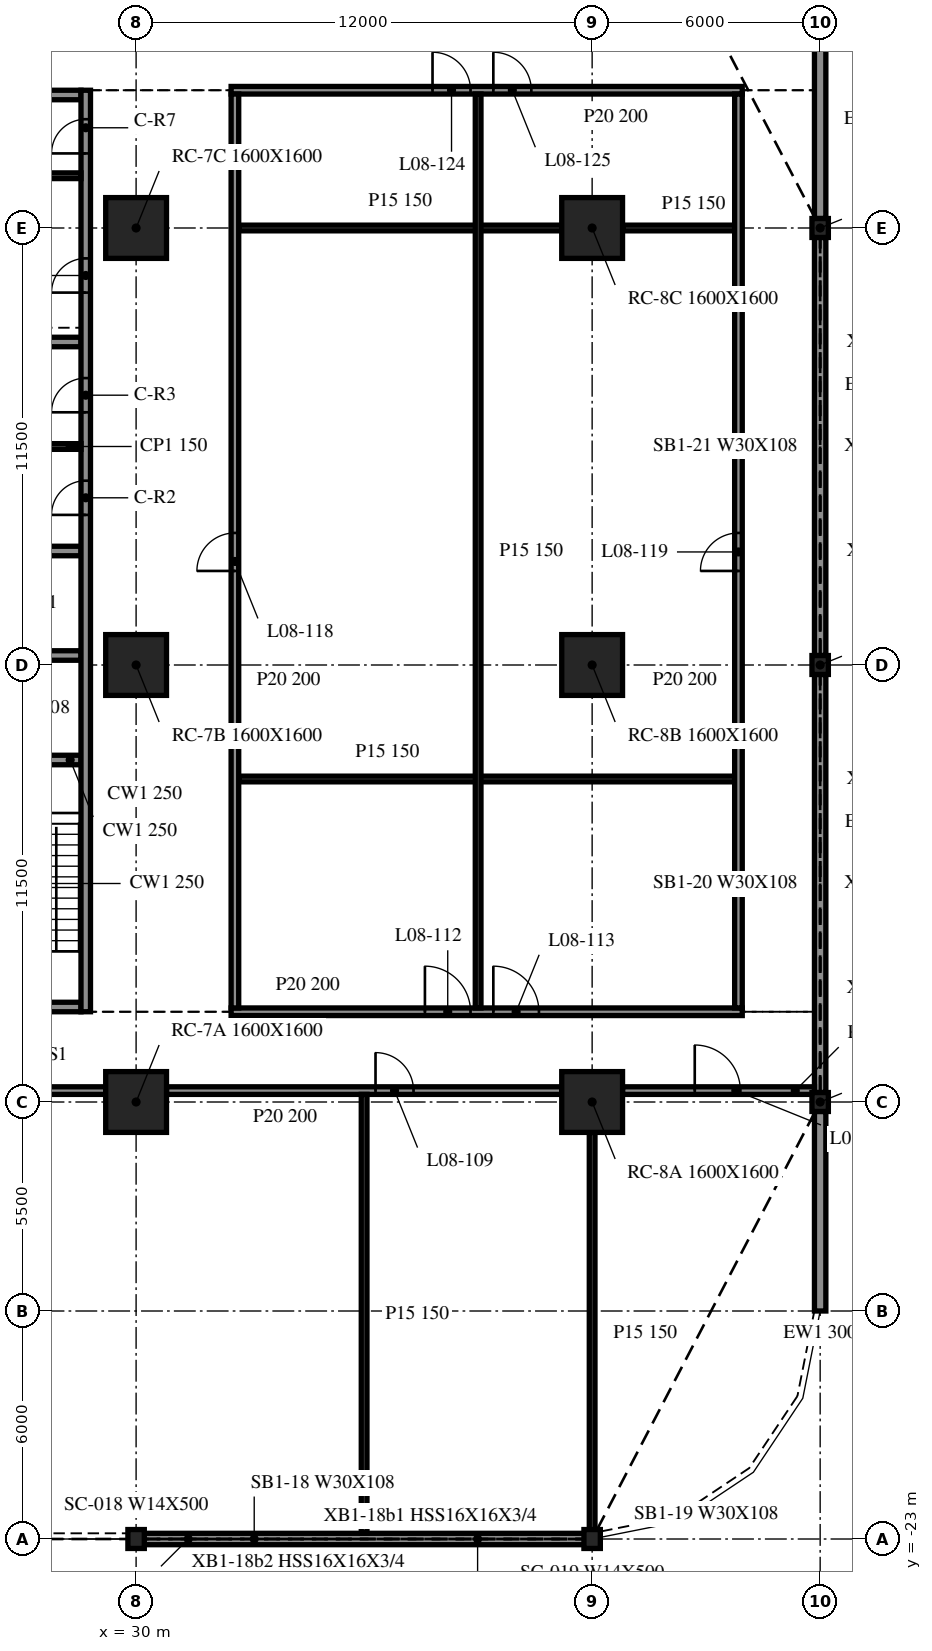
"""IFC4 building model, lengths in metres.
Left out: names, types, materials, properties, quantities, classifications, styles, units other than length and angle.
Written with IfcOpenShell. Run it as: python <this file> out.ifc"""

import sys

from ifc_helpers import new_model, si_unit, direction, frame, frame_2d, origin, origin_2d, place, context, subcontext, project, spatial, rectangle, i_section, extrude, element, fill, save


model = new_model("IFC4")
c1 = context("Model", 3, precision=1e-05, world=origin(), true_north=direction((0.0, 1.0)))
c2 = subcontext(c1, "Body", "Model", "MODEL_VIEW")
j1 = project(units=[si_unit("LENGTHUNIT", "METRE"), si_unit("PLANEANGLEUNIT", "RADIAN")], contexts=[c1])
p1 = place(None, origin())
s1 = spatial("IfcSite", under=j1, at=p1, CompositionType="ELEMENT")
p2 = place(p1, origin())
s2 = spatial("IfcBuilding", under=s1, at=p2, CompositionType="ELEMENT")
p3 = place(p2, frame((0.0, 0.0, 37.3)))
s3 = spatial("IfcBuildingStorey", under=s2, at=p3, CompositionType="ELEMENT", Elevation=37.3)
for number, where, z_axis, x_axis in (
    (1, (30.0, -11.5, -0.34), (0.0, 0.0, 1.0), (1.0, 0.0, 0.0)),
    (2, (30.0, 0.0, -0.34), (0.0, 0.0, 1.0), (1.0, 0.0, 0.0)),
    (3, (30.0, 11.5, -0.34), (0.0, 0.0, 1.0), (1.0, 0.0, 0.0)),
    (4, (42.0, -11.5, -0.34), (0.0, 0.0, 1.0), (1.0, 0.0, 0.0)),
    (5, (42.0, 0.0, -0.34), (0.0, 0.0, 1.0), (1.0, 0.0, 0.0)),
    (6, (42.0, 11.5, -0.34), (0.0, 0.0, 1.0), (1.0, 0.0, 0.0)),
):
    element("IfcColumn", number, at=place(p3, frame(where, z_axis=z_axis, x_axis=x_axis)), inside=s3, PredefinedType="COLUMN", context=c2, shape_type="SweptSolid", body=[
        extrude(rectangle(XDim=1.6, YDim=1.6, at=origin_2d()), origin(), (0.0, 0.0, 1.0), 4.09),
    ])
for number, where, z_axis, x_axis in (
    (7, (30.0, -23.0, -0.34), (0.0, 0.0, 1.0), (1.0, 0.0, 0.0)),
    (8, (42.0, -23.0, -0.34), (0.0, 0.0, 1.0), (1.0, 0.0, 0.0)),
    (9, (48.0, -11.5, -0.34), (0.0, 0.0, 1.0), (1.0, 0.0, 0.0)),
    (10, (48.0, 0.0, -0.34), (0.0, 0.0, 1.0), (1.0, 0.0, 0.0)),
    (11, (48.0, 11.5, -0.34), (0.0, 0.0, 1.0), (1.0, 0.0, 0.0)),
):
    element("IfcColumn", number, at=place(p3, frame(where, z_axis=z_axis, x_axis=x_axis)), inside=s3, PredefinedType="COLUMN", context=c2, shape_type="SweptSolid", body=[
        extrude(i_section(OverallWidth=0.432, OverallDepth=0.498, WebThickness=0.056, FlangeThickness=0.089, at=origin_2d()), origin(), (0.0, 0.0, 1.0), 4.09),
    ])
p4 = place(p3, frame((30.028, -23.0, 0.0), z_axis=(0.0, 0.0, 1.0), x_axis=(1.0, 0.0, 0.0)))
e12 = element("IfcWall", 12, at=p4, inside=s3, PredefinedType="NOTDEFINED", context=c2, shape_type="SweptSolid", body=[
    extrude(rectangle(XDim=11.944, YDim=0.3, at=frame_2d((5.972, 0.0))), origin(), (0.0, 0.0, 1.0), 3.75),
])
p5 = place(p3, frame((48.0, -17.0, 0.0), z_axis=(0.0, 0.0, 1.0), x_axis=(0.0, 1.0, 0.0)))
e13 = element("IfcWall", 13, at=p5, inside=s3, PredefinedType="NOTDEFINED", context=c2, shape_type="SweptSolid", body=[
    extrude(rectangle(XDim=5.251, YDim=0.3, at=frame_2d((2.625, 0.0))), origin(), (0.0, 0.0, 1.0), 3.75),
])
for number, where, z_axis, x_axis in (
    (14, (48.0, -11.251, 0.0), (0.0, 0.0, 1.0), (0.0, 1.0, 0.0)),
    (15, (48.0, 0.249, 0.0), (0.0, 0.0, 1.0), (0.0, 1.0, 0.0)),
):
    element("IfcWall", number, at=place(p3, frame(where, z_axis=z_axis, x_axis=x_axis)), inside=s3, PredefinedType="NOTDEFINED", context=c2, shape_type="SweptSolid", body=[
        extrude(rectangle(XDim=11.002, YDim=0.3, at=frame_2d((5.501, 0.0))), origin(), (0.0, 0.0, 1.0), 3.75),
    ])
p6 = place(p3, frame((48.0, 11.749, 0.0), z_axis=(0.0, 0.0, 1.0), x_axis=(0.0, 1.0, 0.0)))
e16 = element("IfcWall", 16, at=p6, inside=s3, PredefinedType="NOTDEFINED", context=c2, shape_type="SweptSolid", body=[
    extrude(rectangle(XDim=5.251, YDim=0.3, at=frame_2d((2.625, 0.0))), origin(), (0.0, 0.0, 1.0), 3.75),
])
p7 = place(p3, frame((28.675, -9.125, 0.0), z_axis=(0.0, 0.0, 1.0), x_axis=(0.0, 1.0, 0.0)))
e17 = element("IfcWall", 17, at=p7, inside=s3, PredefinedType="SOLIDWALL", context=c2, shape_type="SweptSolid", body=[
    extrude(rectangle(XDim=24.25, YDim=0.25, at=frame_2d((12.125, 0.0))), origin(), (0.0, 0.0, 1.0), 3.75),
])
p8 = place(p7, frame((13.075, 0.0, 0.0)))
e18 = element("IfcOpeningElement", 18, at=p8, cuts=e17, PredefinedType="OPENING", context=c2, shape_type="SweptSolid", body=[
    extrude(rectangle(XDim=0.9, YDim=2.1, at=frame_2d((0.45, 1.05))), frame((0.0, 0.135, 0.0), z_axis=(0.0, -1.0, 0.0), x_axis=(1.0, 0.0, 0.0)), (0.0, 0.0, 1.0), 0.27),
])
p9 = place(p7, frame((15.775, 0.0, 0.0)))
e19 = element("IfcOpeningElement", 19, at=p9, cuts=e17, PredefinedType="OPENING", context=c2, shape_type="SweptSolid", body=[
    extrude(rectangle(XDim=0.9, YDim=2.1, at=frame_2d((0.45, 1.05))), frame((0.0, 0.135, 0.0), z_axis=(0.0, -1.0, 0.0), x_axis=(1.0, 0.0, 0.0)), (0.0, 0.0, 1.0), 0.27),
])
p10 = place(p7, frame((18.925, 0.0, 0.0)))
e20 = element("IfcOpeningElement", 20, at=p10, cuts=e17, PredefinedType="OPENING", context=c2, shape_type="SweptSolid", body=[
    extrude(rectangle(XDim=0.9, YDim=2.1, at=frame_2d((0.45, 1.05))), frame((0.0, 0.135, 0.0), z_axis=(0.0, -1.0, 0.0), x_axis=(1.0, 0.0, 0.0)), (0.0, 0.0, 1.0), 0.27),
])
p11 = place(p7, frame((22.587, 0.0, 0.0)))
e21 = element("IfcOpeningElement", 21, at=p11, cuts=e17, PredefinedType="OPENING", context=c2, shape_type="SweptSolid", body=[
    extrude(rectangle(XDim=0.9, YDim=2.1, at=frame_2d((0.45, 1.05))), frame((0.0, 0.135, 0.0), z_axis=(0.0, -1.0, 0.0), x_axis=(1.0, 0.0, 0.0)), (0.0, 0.0, 1.0), 0.27),
])
p12 = place(p3, frame((28.55, -9.0, 0.0), z_axis=(0.0, 0.0, 1.0), x_axis=(-1.0, 0.0, 0.0)))
e22 = element("IfcWall", 22, at=p12, inside=s3, PredefinedType="SOLIDWALL", context=c2, shape_type="SweptSolid", body=[
    extrude(rectangle(XDim=9.1, YDim=0.25, at=frame_2d((4.55, 0.0))), origin(), (0.0, 0.0, 1.0), 3.75),
])
p13 = place(p12, frame((3.65, 0.0, 0.0)))
e23 = element("IfcOpeningElement", 23, at=p13, cuts=e22, PredefinedType="OPENING", context=c2, shape_type="SweptSolid", body=[
    extrude(rectangle(XDim=1.8, YDim=2.1, at=frame_2d((0.9, 1.05))), frame((0.0, 0.135, 0.0), z_axis=(0.0, -1.0, 0.0), x_axis=(1.0, 0.0, 0.0)), (0.0, 0.0, 1.0), 0.27),
])
p14 = place(p3, frame((19.45, 15.0, 0.0), z_axis=(0.0, 0.0, 1.0), x_axis=(1.0, 0.0, 0.0)))
e24 = element("IfcWall", 24, at=p14, inside=s3, PredefinedType="SOLIDWALL", context=c2, shape_type="SweptSolid", body=[
    extrude(rectangle(XDim=9.1, YDim=0.25, at=frame_2d((4.55, 0.0))), origin(), (0.0, 0.0, 1.0), 3.75),
])
p15 = place(p14, frame((3.65, 0.0, 0.0)))
e25 = element("IfcOpeningElement", 25, at=p15, cuts=e24, PredefinedType="OPENING", context=c2, shape_type="SweptSolid", body=[
    extrude(rectangle(XDim=1.8, YDim=2.1, at=frame_2d((0.9, 1.05))), frame((0.0, 0.135, 0.0), z_axis=(0.0, -1.0, 0.0), x_axis=(1.0, 0.0, 0.0)), (0.0, 0.0, 1.0), 0.27),
])
for number, where, z_axis, x_axis in (
    (26, (25.7, -2.5, 0.0), (0.0, 0.0, 1.0), (1.0, 0.0, 0.0)),
    (27, (25.7, 0.25, 0.0), (0.0, 0.0, 1.0), (1.0, 0.0, 0.0)),
    (28, (25.7, 3.0, 0.0), (0.0, 0.0, 1.0), (1.0, 0.0, 0.0)),
    (29, (25.7, 8.5, 0.0), (0.0, 0.0, 1.0), (1.0, 0.0, 0.0)),
):
    element("IfcWall", number, at=place(p3, frame(where, z_axis=z_axis, x_axis=x_axis)), inside=s3, PredefinedType="SOLIDWALL", context=c2, shape_type="SweptSolid", body=[
        extrude(rectangle(XDim=2.85, YDim=0.25, at=frame_2d((1.425, 0.0))), origin(), (0.0, 0.0, 1.0), 3.75),
    ])
for number, where, z_axis, x_axis in (
    (30, (25.7, 5.75, 0.0), (0.0, 0.0, 1.0), (1.0, 0.0, 0.0)),
    (31, (25.7, 12.875, 0.0), (0.0, 0.0, 1.0), (1.0, 0.0, 0.0)),
):
    element("IfcWall", number, at=place(p3, frame(where, z_axis=z_axis, x_axis=x_axis)), inside=s3, PredefinedType="PARTITIONING", context=c2, shape_type="SweptSolid", body=[
        extrude(rectangle(XDim=2.85, YDim=0.15, at=frame_2d((1.425, 0.0))), origin(), (0.0, 0.0, 1.0), 3.75),
    ])
p16 = place(p3, frame((18.8, -11.2, 0.0), z_axis=(0.0, 0.0, 1.0), x_axis=(1.0, 0.0, 0.0)))
e32 = element("IfcWall", 32, at=p16, inside=s3, PredefinedType="PARTITIONING", context=c2, shape_type="SweptSolid", body=[
    extrude(rectangle(XDim=10.4, YDim=0.2, at=frame_2d((5.2, 0.0))), origin(), (0.0, 0.0, 1.0), 3.75),
])
p17 = place(p16, frame((5.5, 0.0, 0.0)))
e33 = element("IfcOpeningElement", 33, at=p17, cuts=e32, PredefinedType="OPENING", context=c2, shape_type="SweptSolid", body=[
    extrude(rectangle(XDim=1.2, YDim=2.1, at=frame_2d((0.6, 1.05))), frame((0.0, 0.11, 0.0), z_axis=(0.0, -1.0, 0.0), x_axis=(1.0, 0.0, 0.0)), (0.0, 0.0, 1.0), 0.22),
])
p18 = place(p3, frame((30.8, -11.2, 0.0), z_axis=(0.0, 0.0, 1.0), x_axis=(1.0, 0.0, 0.0)))
e34 = element("IfcWall", 34, at=p18, inside=s3, PredefinedType="PARTITIONING", context=c2, shape_type="SweptSolid", body=[
    extrude(rectangle(XDim=10.4, YDim=0.2, at=frame_2d((5.2, 0.0))), origin(), (0.0, 0.0, 1.0), 2.751),
])
p19 = place(p18, frame((5.5, 0.0, 0.0)))
e35 = element("IfcOpeningElement", 35, at=p19, cuts=e34, PredefinedType="OPENING", context=c2, shape_type="SweptSolid", body=[
    extrude(rectangle(XDim=1.0, YDim=2.1, at=frame_2d((0.5, 1.05))), frame((0.0, 0.11, 0.0), z_axis=(0.0, -1.0, 0.0), x_axis=(1.0, 0.0, 0.0)), (0.0, 0.0, 1.0), 0.22),
])
p20 = place(p3, frame((42.8, -11.2, 0.0), z_axis=(0.0, 0.0, 1.0), x_axis=(1.0, 0.0, 0.0)))
e36 = element("IfcWall", 36, at=p20, inside=s3, PredefinedType="PARTITIONING", context=c2, shape_type="SweptSolid", body=[
    extrude(rectangle(XDim=5.05, YDim=0.2, at=frame_2d((2.525, 0.0))), origin(), (0.0, 0.0, 1.0), 2.751),
])
p21 = place(p20, frame((1.9, 0.0, 0.0)))
e37 = element("IfcOpeningElement", 37, at=p21, cuts=e36, PredefinedType="OPENING", context=c2, shape_type="SweptSolid", body=[
    extrude(rectangle(XDim=1.2, YDim=2.1, at=frame_2d((0.6, 1.05))), frame((0.0, 0.11, 0.0), z_axis=(0.0, -1.0, 0.0), x_axis=(1.0, 0.0, 0.0)), (0.0, 0.0, 1.0), 0.22),
])
p22 = place(p3, frame((32.5, -9.125, 0.0), z_axis=(0.0, 0.0, 1.0), x_axis=(1.0, 0.0, 0.0)))
e38 = element("IfcWall", 38, at=p22, inside=s3, PredefinedType="PARTITIONING", context=c2, shape_type="SweptSolid", body=[
    extrude(rectangle(XDim=13.45, YDim=0.2, at=frame_2d((6.725, 0.0))), origin(), (0.0, 0.0, 1.0), 3.75),
])
p23 = place(p22, frame((5.1, 0.0, 0.0)))
e39 = element("IfcOpeningElement", 39, at=p23, cuts=e38, PredefinedType="OPENING", context=c2, shape_type="SweptSolid", body=[
    extrude(rectangle(XDim=1.2, YDim=2.1, at=frame_2d((0.6, 1.05))), frame((0.0, 0.11, 0.0), z_axis=(0.0, -1.0, 0.0), x_axis=(1.0, 0.0, 0.0)), (0.0, 0.0, 1.0), 0.22),
])
p24 = place(p22, frame((6.9, 0.0, 0.0)))
e40 = element("IfcOpeningElement", 40, at=p24, cuts=e38, PredefinedType="OPENING", context=c2, shape_type="SweptSolid", body=[
    extrude(rectangle(XDim=1.2, YDim=2.1, at=frame_2d((0.6, 1.05))), frame((0.0, 0.11, 0.0), z_axis=(0.0, -1.0, 0.0), x_axis=(1.0, 0.0, 0.0)), (0.0, 0.0, 1.0), 0.22),
])
p25 = place(p3, frame((32.7, -3.0, 0.0), z_axis=(0.0, 0.0, 1.0), x_axis=(1.0, 0.0, 0.0)))
e41 = element("IfcWall", 41, at=p25, inside=s3, PredefinedType="PARTITIONING", context=c2, shape_type="SweptSolid", body=[
    extrude(rectangle(XDim=13.05, YDim=0.15, at=frame_2d((6.525, 0.0))), origin(), (0.0, 0.0, 1.0), 3.75),
])
p26 = place(p3, frame((32.7, 11.5, 0.0), z_axis=(0.0, 0.0, 1.0), x_axis=(1.0, 0.0, 0.0)))
e42 = element("IfcWall", 42, at=p26, inside=s3, PredefinedType="PARTITIONING", context=c2, shape_type="SweptSolid", body=[
    extrude(rectangle(XDim=8.5, YDim=0.15, at=frame_2d((4.25, 0.0))), origin(), (0.0, 0.0, 1.0), 2.751),
])
p27 = place(p3, frame((42.8, 11.5, 0.0), z_axis=(0.0, 0.0, 1.0), x_axis=(1.0, 0.0, 0.0)))
e43 = element("IfcWall", 43, at=p27, inside=s3, PredefinedType="PARTITIONING", context=c2, shape_type="SweptSolid", body=[
    extrude(rectangle(XDim=2.95, YDim=0.15, at=frame_2d((1.475, 0.0))), origin(), (0.0, 0.0, 1.0), 2.751),
])
p28 = place(p3, frame((32.5, 15.125, 0.0), z_axis=(0.0, 0.0, 1.0), x_axis=(1.0, 0.0, 0.0)))
e44 = element("IfcWall", 44, at=p28, inside=s3, PredefinedType="PARTITIONING", context=c2, shape_type="SweptSolid", body=[
    extrude(rectangle(XDim=13.45, YDim=0.2, at=frame_2d((6.725, 0.0))), origin(), (0.0, 0.0, 1.0), 3.75),
])
p29 = place(p28, frame((5.3, 0.0, 0.0)))
e45 = element("IfcOpeningElement", 45, at=p29, cuts=e44, PredefinedType="OPENING", context=c2, shape_type="SweptSolid", body=[
    extrude(rectangle(XDim=1.0, YDim=2.1, at=frame_2d((0.5, 1.05))), frame((0.0, 0.11, 0.0), z_axis=(0.0, -1.0, 0.0), x_axis=(1.0, 0.0, 0.0)), (0.0, 0.0, 1.0), 0.22),
])
p30 = place(p28, frame((6.9, 0.0, 0.0)))
e46 = element("IfcOpeningElement", 46, at=p30, cuts=e44, PredefinedType="OPENING", context=c2, shape_type="SweptSolid", body=[
    extrude(rectangle(XDim=1.0, YDim=2.1, at=frame_2d((0.5, 1.05))), frame((0.0, 0.11, 0.0), z_axis=(0.0, -1.0, 0.0), x_axis=(1.0, 0.0, 0.0)), (0.0, 0.0, 1.0), 0.22),
])
p31 = place(p3, frame((32.6, -9.025, 0.0), z_axis=(0.0, 0.0, 1.0), x_axis=(0.0, 1.0, 0.0)))
e47 = element("IfcWall", 47, at=p31, inside=s3, PredefinedType="PARTITIONING", context=c2, shape_type="SweptSolid", body=[
    extrude(rectangle(XDim=24.05, YDim=0.2, at=frame_2d((12.025, 0.0))), origin(), (0.0, 0.0, 1.0), 3.75),
])
p32 = place(p31, frame((11.5, 0.0, 0.0)))
e48 = element("IfcOpeningElement", 48, at=p32, cuts=e47, PredefinedType="OPENING", context=c2, shape_type="SweptSolid", body=[
    extrude(rectangle(XDim=1.0, YDim=2.1, at=frame_2d((0.5, 1.05))), frame((0.0, 0.11, 0.0), z_axis=(0.0, -1.0, 0.0), x_axis=(1.0, 0.0, 0.0)), (0.0, 0.0, 1.0), 0.22),
])
p33 = place(p3, frame((36.0, -22.85, 0.0), z_axis=(0.0, 0.0, 1.0), x_axis=(0.0, 1.0, 0.0)))
e49 = element("IfcWall", 49, at=p33, inside=s3, PredefinedType="PARTITIONING", context=c2, shape_type="SweptSolid", body=[
    extrude(rectangle(XDim=11.55, YDim=0.15, at=frame_2d((5.775, 0.0))), origin(), (0.0, 0.0, 1.0), 3.75),
])
p34 = place(p3, frame((39.0, -9.025, 0.0), z_axis=(0.0, 0.0, 1.0), x_axis=(0.0, 1.0, 0.0)))
e50 = element("IfcWall", 50, at=p34, inside=s3, PredefinedType="PARTITIONING", context=c2, shape_type="SweptSolid", body=[
    extrude(rectangle(XDim=24.05, YDim=0.15, at=frame_2d((12.025, 0.0))), origin(), (0.0, 0.0, 1.0), 3.75),
])
p35 = place(p3, frame((42.0, -22.847, 0.0), z_axis=(0.0, 0.0, 1.0), x_axis=(0.0, 1.0, 0.0)))
e51 = element("IfcWall", 51, at=p35, inside=s3, PredefinedType="PARTITIONING", context=c2, shape_type="SweptSolid", body=[
    extrude(rectangle(XDim=10.547, YDim=0.15, at=frame_2d((5.273, 0.0))), origin(), (0.0, 0.0, 1.0), 3.75),
])
p36 = place(p3, frame((45.85, -9.025, 0.0), z_axis=(0.0, 0.0, 1.0), x_axis=(0.0, 1.0, 0.0)))
e52 = element("IfcWall", 52, at=p36, inside=s3, PredefinedType="PARTITIONING", context=c2, shape_type="SweptSolid", body=[
    extrude(rectangle(XDim=24.05, YDim=0.2, at=frame_2d((12.025, 0.0))), origin(), (0.0, 0.0, 1.0), 3.75),
])
p37 = place(p36, frame((11.5, 0.0, 0.0)))
e53 = element("IfcOpeningElement", 53, at=p37, cuts=e52, PredefinedType="OPENING", context=c2, shape_type="SweptSolid", body=[
    extrude(rectangle(XDim=1.0, YDim=2.1, at=frame_2d((0.5, 1.05))), frame((0.0, 0.11, 0.0), z_axis=(0.0, -1.0, 0.0), x_axis=(1.0, 0.0, 0.0)), (0.0, 0.0, 1.0), 0.22),
])
p38 = place(p8, origin())
e54 = element("IfcDoor", 54, at=p38, inside=s3, OperationType="SINGLE_SWING_RIGHT", PredefinedType="DOOR", context=c2, shape_type="SweptSolid", body=[
    extrude(rectangle(XDim=0.9, YDim=2.1, at=frame_2d((0.45, 1.05))), frame((0.0, 0.025, 0.0), z_axis=(0.0, -1.0, 0.0), x_axis=(1.0, 0.0, 0.0)), (0.0, 0.0, 1.0), 0.05),
])
fill(e18, e54)
p39 = place(p9, origin())
e55 = element("IfcDoor", 55, at=p39, inside=s3, OperationType="SINGLE_SWING_LEFT", PredefinedType="DOOR", context=c2, shape_type="SweptSolid", body=[
    extrude(rectangle(XDim=0.9, YDim=2.1, at=frame_2d((0.45, 1.05))), frame((0.0, 0.025, 0.0), z_axis=(0.0, -1.0, 0.0), x_axis=(1.0, 0.0, 0.0)), (0.0, 0.0, 1.0), 0.05),
])
fill(e19, e55)
p40 = place(p10, origin())
e56 = element("IfcDoor", 56, at=p40, inside=s3, OperationType="SINGLE_SWING_RIGHT", PredefinedType="DOOR", context=c2, shape_type="SweptSolid", body=[
    extrude(rectangle(XDim=0.9, YDim=2.1, at=frame_2d((0.45, 1.05))), frame((0.0, 0.025, 0.0), z_axis=(0.0, -1.0, 0.0), x_axis=(1.0, 0.0, 0.0)), (0.0, 0.0, 1.0), 0.05),
])
fill(e20, e56)
p41 = place(p11, origin())
e57 = element("IfcDoor", 57, at=p41, inside=s3, OperationType="SINGLE_SWING_LEFT", PredefinedType="DOOR", context=c2, shape_type="SweptSolid", body=[
    extrude(rectangle(XDim=0.9, YDim=2.1, at=frame_2d((0.45, 1.05))), frame((0.0, 0.025, 0.0), z_axis=(0.0, -1.0, 0.0), x_axis=(1.0, 0.0, 0.0)), (0.0, 0.0, 1.0), 0.05),
])
fill(e21, e57)
p42 = place(p19, origin())
e58 = element("IfcDoor", 58, at=p42, inside=s3, OperationType="SINGLE_SWING_LEFT", PredefinedType="DOOR", context=c2, shape_type="SweptSolid", body=[
    extrude(rectangle(XDim=1.0, YDim=2.1, at=frame_2d((0.5, 1.05))), frame((0.0, 0.025, 0.0), z_axis=(0.0, -1.0, 0.0), x_axis=(1.0, 0.0, 0.0)), (0.0, 0.0, 1.0), 0.05),
])
fill(e35, e58)
p43 = place(p21, origin())
e59 = element("IfcDoor", 59, at=p43, inside=s3, OperationType="SINGLE_SWING_RIGHT", PredefinedType="DOOR", context=c2, shape_type="SweptSolid", body=[
    extrude(rectangle(XDim=1.2, YDim=2.1, at=frame_2d((0.6, 1.05))), frame((0.0, 0.025, 0.0), z_axis=(0.0, -1.0, 0.0), x_axis=(1.0, 0.0, 0.0)), (0.0, 0.0, 1.0), 0.05),
])
fill(e37, e59)
p44 = place(p23, origin())
e60 = element("IfcDoor", 60, at=p44, inside=s3, OperationType="SINGLE_SWING_LEFT", PredefinedType="DOOR", context=c2, shape_type="SweptSolid", body=[
    extrude(rectangle(XDim=1.2, YDim=2.1, at=frame_2d((0.6, 1.05))), frame((0.0, 0.025, 0.0), z_axis=(0.0, -1.0, 0.0), x_axis=(1.0, 0.0, 0.0)), (0.0, 0.0, 1.0), 0.05),
])
fill(e39, e60)
p45 = place(p24, origin())
e61 = element("IfcDoor", 61, at=p45, inside=s3, OperationType="SINGLE_SWING_RIGHT", PredefinedType="DOOR", context=c2, shape_type="SweptSolid", body=[
    extrude(rectangle(XDim=1.2, YDim=2.1, at=frame_2d((0.6, 1.05))), frame((0.0, 0.025, 0.0), z_axis=(0.0, -1.0, 0.0), x_axis=(1.0, 0.0, 0.0)), (0.0, 0.0, 1.0), 0.05),
])
fill(e40, e61)
p46 = place(p32, origin())
e62 = element("IfcDoor", 62, at=p46, inside=s3, OperationType="SINGLE_SWING_RIGHT", PredefinedType="DOOR", context=c2, shape_type="SweptSolid", body=[
    extrude(rectangle(XDim=1.0, YDim=2.1, at=frame_2d((0.5, 1.05))), frame((0.0, 0.025, 0.0), z_axis=(0.0, -1.0, 0.0), x_axis=(1.0, 0.0, 0.0)), (0.0, 0.0, 1.0), 0.05),
])
fill(e48, e62)
p47 = place(p37, origin())
e63 = element("IfcDoor", 63, at=p47, inside=s3, OperationType="SINGLE_SWING_LEFT", PredefinedType="DOOR", context=c2, shape_type="SweptSolid", body=[
    extrude(rectangle(XDim=1.0, YDim=2.1, at=frame_2d((0.5, 1.05))), frame((0.0, 0.025, 0.0), z_axis=(0.0, -1.0, 0.0), x_axis=(1.0, 0.0, 0.0)), (0.0, 0.0, 1.0), 0.05),
])
fill(e53, e63)
p48 = place(p29, origin())
e64 = element("IfcDoor", 64, at=p48, inside=s3, OperationType="SINGLE_SWING_RIGHT", PredefinedType="DOOR", context=c2, shape_type="SweptSolid", body=[
    extrude(rectangle(XDim=1.0, YDim=2.1, at=frame_2d((0.5, 1.05))), frame((0.0, 0.025, 0.0), z_axis=(0.0, -1.0, 0.0), x_axis=(1.0, 0.0, 0.0)), (0.0, 0.0, 1.0), 0.05),
])
fill(e45, e64)
p49 = place(p30, origin())
e65 = element("IfcDoor", 65, at=p49, inside=s3, OperationType="SINGLE_SWING_LEFT", PredefinedType="DOOR", context=c2, shape_type="SweptSolid", body=[
    extrude(rectangle(XDim=1.0, YDim=2.1, at=frame_2d((0.5, 1.05))), frame((0.0, 0.025, 0.0), z_axis=(0.0, -1.0, 0.0), x_axis=(1.0, 0.0, 0.0)), (0.0, 0.0, 1.0), 0.05),
])
fill(e46, e65)
save(model, sys.argv[1])
